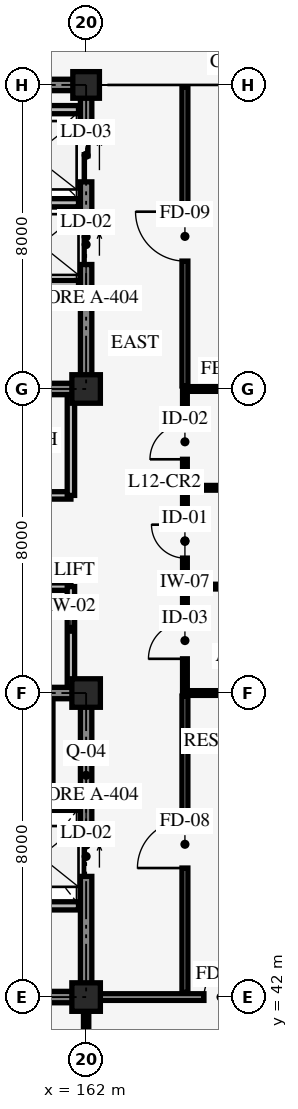
"""IFC4 building model, lengths in metres.
Left out: names, types, materials, properties, quantities, classifications, styles, units other than length and angle.
Written with IfcOpenShell. Run it as: python <this file> out.ifc"""

import sys

from ifc_helpers import new_model, si_unit, direction, frame, frame_2d, origin, origin_2d, place, context, subcontext, project, spatial, rectangle, extrude, element, fill, save


model = new_model("IFC4")
c1 = context("Model", 3, precision=1e-05, world=origin(), true_north=direction((0.0, 1.0)))
c2 = subcontext(c1, "Body", "Model", "MODEL_VIEW")
j1 = project(units=[si_unit("LENGTHUNIT", "METRE"), si_unit("PLANEANGLEUNIT", "RADIAN")], contexts=[c1])
p1 = place(None, origin())
s1 = spatial("IfcSite", under=j1, at=p1, CompositionType="ELEMENT")
p2 = place(p1, origin())
s2 = spatial("IfcBuilding", under=s1, at=p2, CompositionType="ELEMENT")
p3 = place(p2, frame((0.0, 0.0, 48.6)))
s3 = spatial("IfcBuildingStorey", under=s2, at=p3, CompositionType="ELEMENT", Elevation=48.6)
p4 = place(p3, frame((154.0, 42.0, 0.0), z_axis=(0.0, 0.0, 1.0), x_axis=(1.0, 0.0, 0.0)))
e1 = element("IfcWall", 1, at=p4, inside=s3, PredefinedType="SHEAR", context=c2, shape_type="SweptSolid", body=[
    extrude(rectangle(XDim=8.0, YDim=0.3, at=frame_2d((4.0, 0.0))), origin(), (0.0, 0.0, 1.0), 3.95),
])
p5 = place(p3, frame((162.0, 42.0, 0.0), z_axis=(0.0, 0.0, 1.0), x_axis=(0.0, 1.0, 0.0)))
e2 = element("IfcWall", 2, at=p5, inside=s3, PredefinedType="SHEAR", context=c2, shape_type="SweptSolid", body=[
    extrude(rectangle(XDim=8.0, YDim=0.3, at=frame_2d((4.0, 0.0))), origin(), (0.0, 0.0, 1.0), 3.95),
])
p6 = place(p5, frame((3.175, 0.0, 0.0)))
e3 = element("IfcOpeningElement", 3, at=p6, cuts=e2, PredefinedType="OPENING", context=c2, shape_type="SweptSolid", body=[
    extrude(rectangle(XDim=1.05, YDim=2.2, at=frame_2d((0.525, 1.1))), frame((0.0, 0.16, 0.0), z_axis=(0.0, -1.0, 0.0), x_axis=(1.0, 0.0, 0.0)), (0.0, 0.0, 1.0), 0.32),
])
p7 = place(p3, frame((162.0, 50.0, 0.0), z_axis=(0.0, 0.0, 1.0), x_axis=(-1.0, 0.0, 0.0)))
e4 = element("IfcWall", 4, at=p7, inside=s3, PredefinedType="SHEAR", context=c2, shape_type="SweptSolid", body=[
    extrude(rectangle(XDim=8.0, YDim=0.3, at=frame_2d((4.0, 0.0))), origin(), (0.0, 0.0, 1.0), 3.95),
])
p8 = place(p7, frame((5.3, 0.0, 0.0)))
e5 = element("IfcOpeningElement", 5, at=p8, cuts=e4, PredefinedType="OPENING", context=c2, shape_type="SweptSolid", body=[
    extrude(rectangle(XDim=1.3, YDim=2.15, at=frame_2d((0.65, 1.075))), frame((0.0, 0.16, 0.0), z_axis=(0.0, -1.0, 0.0), x_axis=(1.0, 0.0, 0.0)), (0.0, 0.0, 1.0), 0.32),
])
p9 = place(p7, frame((1.45, 0.0, 0.0)))
e6 = element("IfcOpeningElement", 6, at=p9, cuts=e4, PredefinedType="OPENING", context=c2, shape_type="SweptSolid", body=[
    extrude(rectangle(XDim=1.1, YDim=2.2, at=frame_2d((0.55, 1.1))), frame((0.0, 0.16, 0.0), z_axis=(0.0, -1.0, 0.0), x_axis=(1.0, 0.0, 0.0)), (0.0, 0.0, 1.0), 0.32),
])
p10 = place(p3, frame((154.0, 58.0, 0.0), z_axis=(0.0, 0.0, 1.0), x_axis=(1.0, 0.0, 0.0)))
e7 = element("IfcWall", 7, at=p10, inside=s3, PredefinedType="SHEAR", context=c2, shape_type="SweptSolid", body=[
    extrude(rectangle(XDim=8.0, YDim=0.3, at=frame_2d((4.0, 0.0))), origin(), (0.0, 0.0, 1.0), 3.95),
])
p11 = place(p10, frame((1.4, 0.0, 0.0)))
e8 = element("IfcOpeningElement", 8, at=p11, cuts=e7, PredefinedType="OPENING", context=c2, shape_type="SweptSolid", body=[
    extrude(rectangle(XDim=1.3, YDim=2.15, at=frame_2d((0.65, 1.075))), frame((0.0, 0.16, 0.0), z_axis=(0.0, -1.0, 0.0), x_axis=(1.0, 0.0, 0.0)), (0.0, 0.0, 1.0), 0.32),
])
p12 = place(p10, frame((5.3, 0.0, 0.0)))
e9 = element("IfcOpeningElement", 9, at=p12, cuts=e7, PredefinedType="OPENING", context=c2, shape_type="SweptSolid", body=[
    extrude(rectangle(XDim=1.1, YDim=2.2, at=frame_2d((0.55, 1.1))), frame((0.0, 0.16, 0.0), z_axis=(0.0, -1.0, 0.0), x_axis=(1.0, 0.0, 0.0)), (0.0, 0.0, 1.0), 0.32),
])
p13 = place(p3, frame((162.0, 58.0, 0.0), z_axis=(0.0, 0.0, 1.0), x_axis=(0.0, 1.0, 0.0)))
e10 = element("IfcWall", 10, at=p13, inside=s3, PredefinedType="SHEAR", context=c2, shape_type="SweptSolid", body=[
    extrude(rectangle(XDim=8.0, YDim=0.3, at=frame_2d((4.0, 0.0))), origin(), (0.0, 0.0, 1.0), 3.95),
])
p14 = place(p13, frame((3.275, 0.0, 0.0)))
e11 = element("IfcOpeningElement", 11, at=p14, cuts=e10, PredefinedType="OPENING", context=c2, shape_type="SweptSolid", body=[
    extrude(rectangle(XDim=1.05, YDim=2.2, at=frame_2d((0.525, 1.1))), frame((0.0, 0.16, 0.0), z_axis=(0.0, -1.0, 0.0), x_axis=(1.0, 0.0, 0.0)), (0.0, 0.0, 1.0), 0.32),
])
p15 = place(p13, frame((5.45, 0.0, 0.0)))
e12 = element("IfcOpeningElement", 12, at=p15, cuts=e10, PredefinedType="OPENING", context=c2, shape_type="SweptSolid", body=[
    extrude(rectangle(XDim=1.4, YDim=2.3, at=frame_2d((0.7, 1.15))), frame((0.0, 0.16, 0.0), z_axis=(0.0, -1.0, 0.0), x_axis=(1.0, 0.0, 0.0)), (0.0, 0.0, 1.0), 0.32),
])
p16 = place(p3, frame((162.0, 66.0, 0.0), z_axis=(0.0, 0.0, 1.0), x_axis=(-1.0, 0.0, 0.0)))
e13 = element("IfcWall", 13, at=p16, inside=s3, PredefinedType="SHEAR", context=c2, shape_type="SweptSolid", body=[
    extrude(rectangle(XDim=8.0, YDim=0.3, at=frame_2d((4.0, 0.0))), origin(), (0.0, 0.0, 1.0), 3.95),
])
for number, where, z_axis, x_axis in (
    (14, (162.0, 42.0, 0.0), (0.0, 0.0, 1.0), (1.0, 0.0, 0.0)),
    (15, (162.0, 50.0, 0.0), (0.0, 0.0, 1.0), (1.0, 0.0, 0.0)),
    (16, (162.0, 58.0, 0.0), (0.0, 0.0, 1.0), (1.0, 0.0, 0.0)),
):
    element("IfcColumn", number, at=place(p3, frame(where, z_axis=z_axis, x_axis=x_axis)), inside=s3, PredefinedType="COLUMN", context=c2, shape_type="SweptSolid", body=[
        extrude(rectangle(XDim=0.75, YDim=0.75, at=origin_2d()), origin(), (0.0, 0.0, 1.0), 4.2),
    ])
p17 = place(p3, frame((162.0, 66.0, 0.0), z_axis=(0.0, 0.0, 1.0), x_axis=(1.0, 0.0, 0.0)))
e17 = element("IfcColumn", 17, at=p17, inside=s3, PredefinedType="COLUMN", context=c2, shape_type="SweptSolid", body=[
    extrude(rectangle(XDim=0.7, YDim=0.7, at=origin_2d()), origin(), (0.0, 0.0, 1.0), 4.2),
])
p18 = place(p3, frame((158.45, 47.02, 0.0), z_axis=(0.0, 0.0, 1.0), x_axis=(1.0, 0.0, 0.0)))
e18 = element("IfcWall", 18, at=p18, inside=s3, PredefinedType="STANDARD", context=c2, shape_type="SweptSolid", body=[
    extrude(rectangle(XDim=3.35, YDim=0.215, at=frame_2d((1.675, 0.0))), origin(), (0.0, 0.0, 1.0), 3.9),
])
p19 = place(p3, frame((161.02, 47.02, 0.0), z_axis=(0.0, 0.0, 1.0), x_axis=(0.0, 1.0, 0.0)))
e19 = element("IfcWall", 19, at=p19, inside=s3, PredefinedType="STANDARD", context=c2, shape_type="SweptSolid", body=[
    extrude(rectangle(XDim=2.78, YDim=0.215, at=frame_2d((1.39, 0.0))), origin(), (0.0, 0.0, 1.0), 3.9),
])
p20 = place(p3, frame((159.78, 44.4, 0.0), z_axis=(0.0, 0.0, 1.0), x_axis=(1.0, 0.0, 0.0)))
e20 = element("IfcWall", 20, at=p20, inside=s3, PredefinedType="STANDARD", context=c2, shape_type="SweptSolid", body=[
    extrude(rectangle(XDim=2.02, YDim=0.215, at=frame_2d((1.01, 0.0))), origin(), (0.0, 0.0, 1.0), 3.9),
])
p21 = place(p3, frame((158.45, 62.9, 0.0), z_axis=(0.0, 0.0, 1.0), x_axis=(1.0, 0.0, 0.0)))
e21 = element("IfcWall", 21, at=p21, inside=s3, PredefinedType="STANDARD", context=c2, shape_type="SweptSolid", body=[
    extrude(rectangle(XDim=3.35, YDim=0.215, at=frame_2d((1.675, 0.0))), origin(), (0.0, 0.0, 1.0), 3.9),
])
p22 = place(p3, frame((159.38, 65.35, 0.0), z_axis=(0.0, 0.0, 1.0), x_axis=(1.0, 0.0, 0.0)))
e22 = element("IfcWall", 22, at=p22, inside=s3, PredefinedType="STANDARD", context=c2, shape_type="SweptSolid", body=[
    extrude(rectangle(XDim=2.42, YDim=0.215, at=frame_2d((1.21, 0.0))), origin(), (0.0, 0.0, 1.0), 3.9),
])
p23 = place(p3, frame((158.45, 60.75, 0.0), z_axis=(0.0, 0.0, 1.0), x_axis=(1.0, 0.0, 0.0)))
e23 = element("IfcWall", 23, at=p23, inside=s3, PredefinedType="STANDARD", context=c2, shape_type="SweptSolid", body=[
    extrude(rectangle(XDim=3.35, YDim=0.215, at=frame_2d((1.675, 0.0))), origin(), (0.0, 0.0, 1.0), 3.9),
])
p24 = place(p3, frame((154.0, 52.8, 0.0), z_axis=(0.0, 0.0, 1.0), x_axis=(1.0, 0.0, 0.0)))
e24 = element("IfcWall", 24, at=p24, inside=s3, PredefinedType="STANDARD", context=c2, shape_type="SweptSolid", body=[
    extrude(rectangle(XDim=7.6, YDim=0.195, at=frame_2d((3.8, 0.0))), origin(), (0.0, 0.0, 1.0), 3.9),
])
p25 = place(p24, frame((2.8, 0.0, 0.0)))
e25 = element("IfcOpeningElement", 25, at=p25, cuts=e24, PredefinedType="OPENING", context=c2, shape_type="SweptSolid", body=[
    extrude(rectangle(XDim=1.2, YDim=2.1, at=frame_2d((0.6, 1.05))), frame((0.0, 0.107, 0.0), z_axis=(0.0, -1.0, 0.0), x_axis=(1.0, 0.0, 0.0)), (0.0, 0.0, 1.0), 0.215),
])
p26 = place(p3, frame((161.6, 50.15, 0.0), z_axis=(0.0, 0.0, 1.0), x_axis=(0.0, 1.0, 0.0)))
e26 = element("IfcWall", 26, at=p26, inside=s3, PredefinedType="STANDARD", context=c2, shape_type="SweptSolid", body=[
    extrude(rectangle(XDim=2.65, YDim=0.195, at=frame_2d((1.325, 0.0))), origin(), (0.0, 0.0, 1.0), 3.24),
])
p27 = place(p3, frame((154.0, 55.2, 0.0), z_axis=(0.0, 0.0, 1.0), x_axis=(1.0, 0.0, 0.0)))
e27 = element("IfcWall", 27, at=p27, inside=s3, PredefinedType="STANDARD", context=c2, shape_type="SweptSolid", body=[
    extrude(rectangle(XDim=7.6, YDim=0.195, at=frame_2d((3.8, 0.0))), origin(), (0.0, 0.0, 1.0), 3.9),
])
p28 = place(p27, frame((2.8, 0.0, 0.0)))
e28 = element("IfcOpeningElement", 28, at=p28, cuts=e27, PredefinedType="OPENING", context=c2, shape_type="SweptSolid", body=[
    extrude(rectangle(XDim=1.3, YDim=2.15, at=frame_2d((0.65, 1.075))), frame((0.0, 0.107, 0.0), z_axis=(0.0, -1.0, 0.0), x_axis=(1.0, 0.0, 0.0)), (0.0, 0.0, 1.0), 0.215),
])
p29 = place(p3, frame((161.6, 55.2, 0.0), z_axis=(0.0, 0.0, 1.0), x_axis=(0.0, 1.0, 0.0)))
e29 = element("IfcWall", 29, at=p29, inside=s3, PredefinedType="STANDARD", context=c2, shape_type="SweptSolid", body=[
    extrude(rectangle(XDim=2.65, YDim=0.195, at=frame_2d((1.325, 0.0))), origin(), (0.0, 0.0, 1.0), 3.24),
])
p30 = place(p3, frame((164.6, 50.0, 0.0), z_axis=(0.0, 0.0, 1.0), x_axis=(0.0, 1.0, 0.0)))
e30 = element("IfcWall", 30, at=p30, inside=s3, PredefinedType="STANDARD", context=c2, shape_type="SweptSolid", body=[
    extrude(rectangle(XDim=8.0, YDim=0.125, at=frame_2d((4.0, 0.0))), origin(), (0.0, 0.0, 1.0), 3.9),
])
p31 = place(p30, frame((0.9, 0.0, 0.0)))
e31 = element("IfcOpeningElement", 31, at=p31, cuts=e30, PredefinedType="OPENING", context=c2, shape_type="SweptSolid", body=[
    extrude(rectangle(XDim=0.96, YDim=2.08, at=frame_2d((0.48, 1.04))), frame((0.0, 0.073, 0.0), z_axis=(0.0, -1.0, 0.0), x_axis=(1.0, 0.0, 0.0)), (0.0, 0.0, 1.0), 0.145),
])
p32 = place(p30, frame((3.55, 0.0, 0.0)))
e32 = element("IfcOpeningElement", 32, at=p32, cuts=e30, PredefinedType="OPENING", context=c2, shape_type="SweptSolid", body=[
    extrude(rectangle(XDim=0.88, YDim=2.05, at=frame_2d((0.44, 1.025))), frame((0.0, 0.073, 0.0), z_axis=(0.0, -1.0, 0.0), x_axis=(1.0, 0.0, 0.0)), (0.0, 0.0, 1.0), 0.145),
])
p33 = place(p30, frame((6.15, 0.0, 0.0)))
e33 = element("IfcOpeningElement", 33, at=p33, cuts=e30, PredefinedType="OPENING", context=c2, shape_type="SweptSolid", body=[
    extrude(rectangle(XDim=0.92, YDim=2.05, at=frame_2d((0.46, 1.025))), frame((0.0, 0.073, 0.0), z_axis=(0.0, -1.0, 0.0), x_axis=(1.0, 0.0, 0.0)), (0.0, 0.0, 1.0), 0.145),
])
p34 = place(p3, frame((164.6, 50.0, 0.0), z_axis=(0.0, 0.0, 1.0), x_axis=(1.0, 0.0, 0.0)))
e34 = element("IfcWall", 34, at=p34, inside=s3, PredefinedType="STANDARD", context=c2, shape_type="SweptSolid", body=[
    extrude(rectangle(XDim=3.8, YDim=0.125, at=frame_2d((1.9, 0.0))), origin(), (0.0, 0.0, 1.0), 3.19),
])
for number, where, z_axis, x_axis in (
    (35, (164.6, 52.8, 0.0), (0.0, 0.0, 1.0), (1.0, 0.0, 0.0)),
    (36, (164.6, 55.4, 0.0), (0.0, 0.0, 1.0), (1.0, 0.0, 0.0)),
):
    element("IfcWall", number, at=place(p3, frame(where, z_axis=z_axis, x_axis=x_axis)), inside=s3, PredefinedType="STANDARD", context=c2, shape_type="SweptSolid", body=[
        extrude(rectangle(XDim=3.8, YDim=0.125, at=frame_2d((1.9, 0.0))), origin(), (0.0, 0.0, 1.0), 3.9),
    ])
p35 = place(p3, frame((164.6, 58.0, 0.0), z_axis=(0.0, 0.0, 1.0), x_axis=(1.0, 0.0, 0.0)))
e37 = element("IfcWall", 37, at=p35, inside=s3, PredefinedType="STANDARD", context=c2, shape_type="SweptSolid", body=[
    extrude(rectangle(XDim=3.8, YDim=0.125, at=frame_2d((1.9, 0.0))), origin(), (0.0, 0.0, 1.0), 3.19),
])
p36 = place(p3, frame((164.6, 42.12, 0.0), z_axis=(0.0, 0.0, 1.0), x_axis=(0.0, 1.0, 0.0)))
e38 = element("IfcWall", 38, at=p36, inside=s3, PredefinedType="STANDARD", context=c2, shape_type="SweptSolid", body=[
    extrude(rectangle(XDim=7.8, YDim=0.155, at=frame_2d((3.9, 0.0))), origin(), (0.0, 0.0, 1.0), 3.9),
])
p37 = place(p36, frame((3.275, 0.0, 0.0)))
e39 = element("IfcOpeningElement", 39, at=p37, cuts=e38, PredefinedType="OPENING", context=c2, shape_type="SweptSolid", body=[
    extrude(rectangle(XDim=1.25, YDim=2.15, at=frame_2d((0.625, 1.075))), frame((0.0, 0.087, 0.0), z_axis=(0.0, -1.0, 0.0), x_axis=(1.0, 0.0, 0.0)), (0.0, 0.0, 1.0), 0.175),
])
p38 = place(p3, frame((164.6, 58.08, 0.0), z_axis=(0.0, 0.0, 1.0), x_axis=(0.0, 1.0, 0.0)))
e40 = element("IfcWall", 40, at=p38, inside=s3, PredefinedType="STANDARD", context=c2, shape_type="SweptSolid", body=[
    extrude(rectangle(XDim=7.87, YDim=0.155, at=frame_2d((3.935, 0.0))), origin(), (0.0, 0.0, 1.0), 3.9),
])
p39 = place(p38, frame((3.285, 0.0, 0.0)))
e41 = element("IfcOpeningElement", 41, at=p39, cuts=e40, PredefinedType="OPENING", context=c2, shape_type="SweptSolid", body=[
    extrude(rectangle(XDim=1.3, YDim=2.15, at=frame_2d((0.65, 1.075))), frame((0.0, 0.087, 0.0), z_axis=(0.0, -1.0, 0.0), x_axis=(1.0, 0.0, 0.0)), (0.0, 0.0, 1.0), 0.175),
])
p40 = place(p3, frame((162.0, 34.05, 0.0), z_axis=(0.0, 0.0, 1.0), x_axis=(0.0, 1.0, 0.0)))
e42 = element("IfcWall", 42, at=p40, inside=s3, PredefinedType="STANDARD", context=c2, shape_type="SweptSolid", body=[
    extrude(rectangle(XDim=7.83, YDim=0.14, at=frame_2d((3.915, 0.0))), origin(), (0.0, 0.0, 1.0), 3.24),
])
p41 = place(p40, frame((3.0, 0.0, 0.0)))
e43 = element("IfcOpeningElement", 43, at=p41, cuts=e42, PredefinedType="OPENING", context=c2, shape_type="SweptSolid", body=[
    extrude(rectangle(XDim=1.06, YDim=2.12, at=frame_2d((0.53, 1.06))), frame((0.0, 0.08, 0.0), z_axis=(0.0, -1.0, 0.0), x_axis=(1.0, 0.0, 0.0)), (0.0, 0.0, 1.0), 0.16),
])
p42 = place(p3, frame((162.35, 42.0, 0.0), z_axis=(0.0, 0.0, 1.0), x_axis=(1.0, 0.0, 0.0)))
e44 = element("IfcWall", 44, at=p42, inside=s3, PredefinedType="STANDARD", context=c2, shape_type="SweptSolid", body=[
    extrude(rectangle(XDim=14.7, YDim=0.175, at=frame_2d((7.35, 0.0))), origin(), (0.0, 0.0, 1.0), 3.19),
])
p43 = place(p42, frame((2.75, 0.0, 0.0)))
e45 = element("IfcOpeningElement", 45, at=p43, cuts=e44, PredefinedType="OPENING", context=c2, shape_type="SweptSolid", body=[
    extrude(rectangle(XDim=0.9, YDim=2.1, at=frame_2d((0.45, 1.05))), frame((0.0, 0.098, 0.0), z_axis=(0.0, -1.0, 0.0), x_axis=(1.0, 0.0, 0.0)), (0.0, 0.0, 1.0), 0.195),
])
p44 = place(p6, origin())
e46 = element("IfcDoor", 46, at=p44, inside=s3, OperationType="SLIDING_TO_LEFT", PredefinedType="DOOR", context=c2, shape_type="SweptSolid", body=[
    extrude(rectangle(XDim=1.05, YDim=2.2, at=frame_2d((0.525, 1.1))), frame((0.0, 0.025, 0.0), z_axis=(0.0, -1.0, 0.0), x_axis=(1.0, 0.0, 0.0)), (0.0, 0.0, 1.0), 0.05),
])
fill(e3, e46)
p45 = place(p14, origin())
e47 = element("IfcDoor", 47, at=p45, inside=s3, OperationType="SLIDING_TO_RIGHT", PredefinedType="DOOR", context=c2, shape_type="SweptSolid", body=[
    extrude(rectangle(XDim=1.05, YDim=2.2, at=frame_2d((0.525, 1.1))), frame((0.0, 0.025, 0.0), z_axis=(0.0, -1.0, 0.0), x_axis=(1.0, 0.0, 0.0)), (0.0, 0.0, 1.0), 0.05),
])
fill(e11, e47)
p46 = place(p15, origin())
e48 = element("IfcDoor", 48, at=p46, inside=s3, OperationType="DOUBLE_DOOR_SLIDING", PredefinedType="DOOR", context=c2, shape_type="SweptSolid", body=[
    extrude(rectangle(XDim=1.4, YDim=2.3, at=frame_2d((0.7, 1.15))), frame((0.0, 0.025, 0.0), z_axis=(0.0, -1.0, 0.0), x_axis=(1.0, 0.0, 0.0)), (0.0, 0.0, 1.0), 0.05),
])
fill(e12, e48)
p47 = place(p31, origin())
e49 = element("IfcDoor", 49, at=p47, inside=s3, OperationType="SINGLE_SWING_LEFT", PredefinedType="DOOR", context=c2, shape_type="SweptSolid", body=[
    extrude(rectangle(XDim=0.96, YDim=2.08, at=frame_2d((0.48, 1.04))), frame((0.0, 0.025, 0.0), z_axis=(0.0, -1.0, 0.0), x_axis=(1.0, 0.0, 0.0)), (0.0, 0.0, 1.0), 0.05),
])
fill(e31, e49)
p48 = place(p32, origin())
e50 = element("IfcDoor", 50, at=p48, inside=s3, OperationType="SINGLE_SWING_RIGHT", PredefinedType="DOOR", context=c2, shape_type="SweptSolid", body=[
    extrude(rectangle(XDim=0.88, YDim=2.05, at=frame_2d((0.44, 1.025))), frame((0.0, 0.025, 0.0), z_axis=(0.0, -1.0, 0.0), x_axis=(1.0, 0.0, 0.0)), (0.0, 0.0, 1.0), 0.05),
])
fill(e32, e50)
p49 = place(p33, origin())
e51 = element("IfcDoor", 51, at=p49, inside=s3, OperationType="SINGLE_SWING_LEFT", PredefinedType="DOOR", context=c2, shape_type="SweptSolid", body=[
    extrude(rectangle(XDim=0.92, YDim=2.05, at=frame_2d((0.46, 1.025))), frame((0.0, 0.025, 0.0), z_axis=(0.0, -1.0, 0.0), x_axis=(1.0, 0.0, 0.0)), (0.0, 0.0, 1.0), 0.05),
])
fill(e33, e51)
p50 = place(p37, origin())
e52 = element("IfcDoor", 52, at=p50, inside=s3, OperationType="SINGLE_SWING_LEFT", PredefinedType="DOOR", context=c2, shape_type="SweptSolid", body=[
    extrude(rectangle(XDim=1.25, YDim=2.15, at=frame_2d((0.625, 1.075))), frame((0.0, 0.025, 0.0), z_axis=(0.0, -1.0, 0.0), x_axis=(1.0, 0.0, 0.0)), (0.0, 0.0, 1.0), 0.05),
])
fill(e39, e52)
p51 = place(p39, origin())
e53 = element("IfcDoor", 53, at=p51, inside=s3, OperationType="SINGLE_SWING_RIGHT", PredefinedType="DOOR", context=c2, shape_type="SweptSolid", body=[
    extrude(rectangle(XDim=1.3, YDim=2.15, at=frame_2d((0.65, 1.075))), frame((0.0, 0.025, 0.0), z_axis=(0.0, -1.0, 0.0), x_axis=(1.0, 0.0, 0.0)), (0.0, 0.0, 1.0), 0.05),
])
fill(e41, e53)
p52 = place(p43, origin())
e54 = element("IfcDoor", 54, at=p52, inside=s3, OperationType="SINGLE_SWING_RIGHT", PredefinedType="DOOR", context=c2, shape_type="SweptSolid", body=[
    extrude(rectangle(XDim=0.9, YDim=2.1, at=frame_2d((0.45, 1.05))), frame((0.0, 0.025, 0.0), z_axis=(0.0, -1.0, 0.0), x_axis=(1.0, 0.0, 0.0)), (0.0, 0.0, 1.0), 0.05),
])
fill(e45, e54)
save(model, sys.argv[1])
